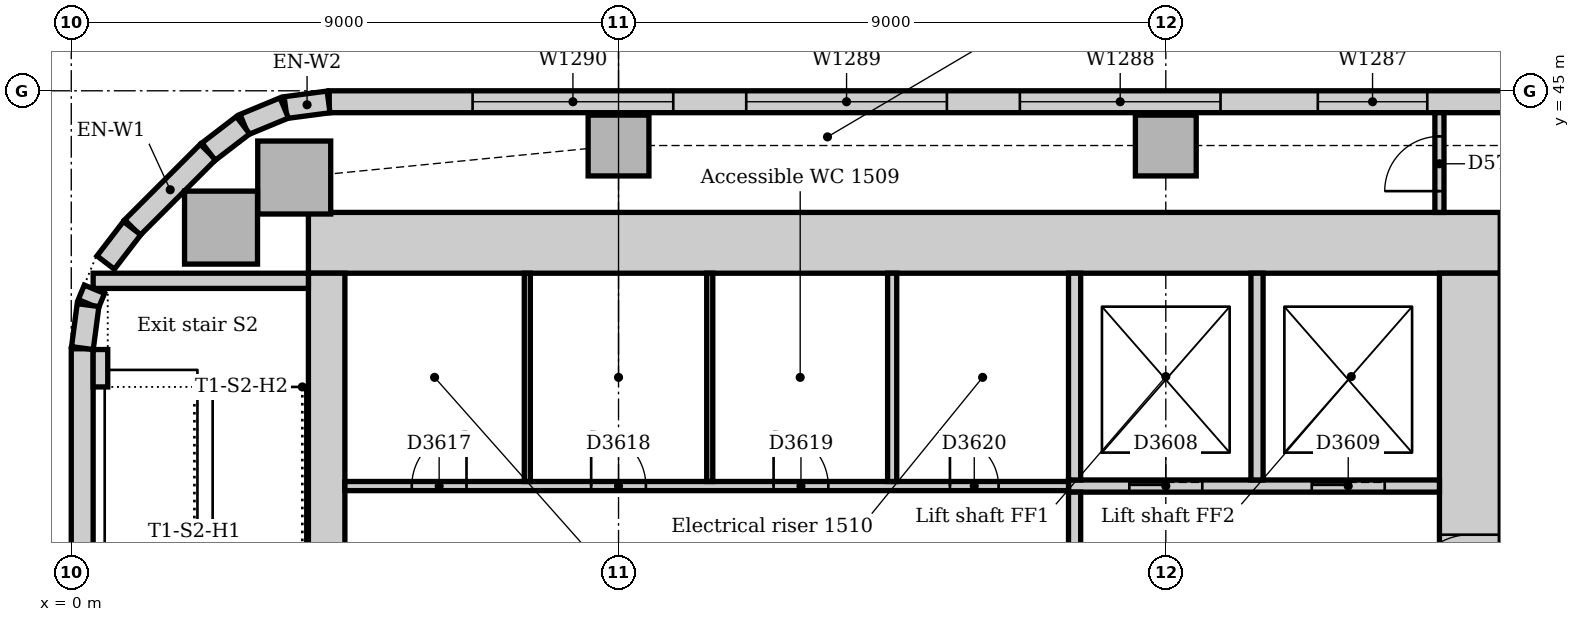
"""IFC4 building model, lengths in metres.
Left out: names, types, materials, properties, quantities, classifications, styles, units other than length and angle.
Written with IfcOpenShell. Run it as: python <this file> out.ifc"""

import sys

from ifc_helpers import new_model, si_unit, direction, frame, frame_2d, origin, origin_2d, place, context, subcontext, project, spatial, rectangle, extrude, element, fill, save


model = new_model("IFC4")
c1 = context("Model", 3, precision=1e-05, world=origin(), true_north=direction((0.0, 1.0)))
c2 = subcontext(c1, "Body", "Model", "MODEL_VIEW")
j1 = project(units=[si_unit("LENGTHUNIT", "METRE"), si_unit("PLANEANGLEUNIT", "RADIAN")], contexts=[c1])
p1 = place(None, origin())
s1 = spatial("IfcSite", under=j1, at=p1, CompositionType="ELEMENT")
p2 = place(p1, origin())
s2 = spatial("IfcBuilding", under=s1, at=p2, CompositionType="ELEMENT")
p3 = place(p2, frame((0.0, 0.0, 67.0)))
s3 = spatial("IfcBuildingStorey", under=s2, at=p3, CompositionType="ELEMENT", Elevation=67.0)
p4 = place(p3, frame((23.5, 42.5, 0.0), z_axis=(0.0, 0.0, 1.0), x_axis=(-1.0, 0.0, 0.0)))
e1 = element("IfcWall", 1, at=p4, inside=s3, PredefinedType="SOLIDWALL", context=c2, shape_type="SweptSolid", body=[
    extrude(rectangle(XDim=19.6, YDim=1.0, at=frame_2d((9.8, 0.0))), origin(), (0.0, 0.0, 1.0), 4.0),
])
p5 = place(p3, frame((23.0, 31.5, 0.0), z_axis=(0.0, 0.0, 1.0), x_axis=(0.0, 1.0, 0.0)))
e2 = element("IfcWall", 2, at=p5, inside=s3, PredefinedType="SOLIDWALL", context=c2, shape_type="SweptSolid", body=[
    extrude(rectangle(XDim=10.5, YDim=1.0, at=frame_2d((5.25, 0.0))), origin(), (0.0, 0.0, 1.0), 4.0),
])
p6 = place(p5, frame((3.15, 0.0, 0.0)))
e3 = element("IfcOpeningElement", 3, at=p6, cuts=e2, PredefinedType="OPENING", context=c2, shape_type="SweptSolid", body=[
    extrude(rectangle(XDim=1.0, YDim=2.1, at=frame_2d((0.5, 1.05))), frame((0.0, 0.51, 0.0), z_axis=(0.0, -1.0, 0.0), x_axis=(1.0, 0.0, 0.0)), (0.0, 0.0, 1.0), 1.02),
])
p7 = place(p5, frame((5.2, 0.0, 0.0)))
e4 = element("IfcOpeningElement", 4, at=p7, cuts=e2, PredefinedType="OPENING", context=c2, shape_type="SweptSolid", body=[
    extrude(rectangle(XDim=1.0, YDim=2.1, at=frame_2d((0.5, 1.05))), frame((0.0, 0.51, 0.0), z_axis=(0.0, -1.0, 0.0), x_axis=(1.0, 0.0, 0.0)), (0.0, 0.0, 1.0), 1.02),
])
p8 = place(p3, frame((4.2, 42.0, 0.0), z_axis=(0.0, 0.0, 1.0), x_axis=(0.0, -1.0, 0.0)))
e5 = element("IfcWall", 5, at=p8, inside=s3, PredefinedType="SOLIDWALL", context=c2, shape_type="SweptSolid", body=[
    extrude(rectangle(XDim=10.5, YDim=0.6, at=frame_2d((5.25, 0.0))), origin(), (0.0, 0.0, 1.0), 4.0),
])
p9 = place(p8, frame((5.3, 0.0, 0.0)))
e6 = element("IfcOpeningElement", 6, at=p9, cuts=e5, PredefinedType="OPENING", context=c2, shape_type="SweptSolid", body=[
    extrude(rectangle(XDim=1.0, YDim=2.1, at=frame_2d((0.5, 1.05))), frame((0.0, 0.31, 0.0), z_axis=(0.0, -1.0, 0.0), x_axis=(1.0, 0.0, 0.0)), (0.0, 0.0, 1.0), 0.62),
])
p10 = place(p3, frame((3.9, 41.875, 0.0), z_axis=(0.0, 0.0, 1.0), x_axis=(-1.0, 0.0, 0.0)))
e7 = element("IfcWall", 7, at=p10, inside=s3, PredefinedType="SOLIDWALL", context=c2, shape_type="SweptSolid", body=[
    extrude(rectangle(XDim=3.54, YDim=0.25, at=frame_2d((1.77, 0.0))), origin(), (0.0, 0.0, 1.0), 4.0),
])
for number, where, z_axis, x_axis in (
    (8, (3.667, 43.574, 0.0), (0.0, 0.0, 1.0), (1.0, 0.0, 0.0)),
    (9, (2.463, 42.75, 0.0), (0.0, 0.0, 1.0), (1.0, 0.0, 0.0)),
):
    element("IfcColumn", number, at=place(p3, frame(where, z_axis=z_axis, x_axis=x_axis)), inside=s3, PredefinedType="COLUMN", context=c2, shape_type="SweptSolid", body=[
        extrude(rectangle(XDim=1.2, YDim=1.2, at=origin_2d()), origin(), (0.0, 0.0, 1.0), 3.85),
    ])
for number, where, z_axis, x_axis in (
    (10, (9.0, 44.1, 0.0), (0.0, 0.0, 1.0), (1.0, 0.0, 0.0)),
    (11, (18.0, 44.1, 0.0), (0.0, 0.0, 1.0), (1.0, 0.0, 0.0)),
):
    element("IfcColumn", number, at=place(p3, frame(where, z_axis=z_axis, x_axis=x_axis)), inside=s3, PredefinedType="COLUMN", context=c2, shape_type="SweptSolid", body=[
        extrude(rectangle(XDim=1.0, YDim=1.0, at=origin_2d()), origin(), (0.0, 0.0, 1.0), 3.85),
    ])
p11 = place(p3, frame((48.257, 44.82, 0.0), z_axis=(0.0, 0.0, 1.0), x_axis=(-1.0, 0.0, 0.0)))
e12 = element("IfcWall", 12, at=p11, inside=s3, PredefinedType="STANDARD", context=c2, shape_type="SweptSolid", body=[
    extrude(rectangle(XDim=44.015, YDim=0.36, at=frame_2d((22.007, 0.0))), origin(), (0.0, 0.0, 1.0), 3.85),
])
p12 = place(p11, frame((2.057, 0.0, 0.9)))
e13 = element("IfcOpeningElement", 13, at=p12, cuts=e12, PredefinedType="OPENING", context=c2, shape_type="SweptSolid", body=[
    extrude(rectangle(XDim=3.3, YDim=1.6, at=frame_2d((1.65, 0.8))), frame((0.0, 0.19, 0.0), z_axis=(0.0, -1.0, 0.0), x_axis=(1.0, 0.0, 0.0)), (0.0, 0.0, 1.0), 0.38),
])
p13 = place(p11, frame((6.857, 0.0, 0.9)))
e14 = element("IfcOpeningElement", 14, at=p13, cuts=e12, PredefinedType="OPENING", context=c2, shape_type="SweptSolid", body=[
    extrude(rectangle(XDim=3.3, YDim=1.6, at=frame_2d((1.65, 0.8))), frame((0.0, 0.19, 0.0), z_axis=(0.0, -1.0, 0.0), x_axis=(1.0, 0.0, 0.0)), (0.0, 0.0, 1.0), 0.38),
])
p14 = place(p11, frame((11.357, 0.0, 0.9)))
e15 = element("IfcOpeningElement", 15, at=p14, cuts=e12, PredefinedType="OPENING", context=c2, shape_type="SweptSolid", body=[
    extrude(rectangle(XDim=3.3, YDim=1.6, at=frame_2d((1.65, 0.8))), frame((0.0, 0.19, 0.0), z_axis=(0.0, -1.0, 0.0), x_axis=(1.0, 0.0, 0.0)), (0.0, 0.0, 1.0), 0.38),
])
p15 = place(p11, frame((15.857, 0.0, 0.9)))
e16 = element("IfcOpeningElement", 16, at=p15, cuts=e12, PredefinedType="OPENING", context=c2, shape_type="SweptSolid", body=[
    extrude(rectangle(XDim=3.3, YDim=1.6, at=frame_2d((1.65, 0.8))), frame((0.0, 0.19, 0.0), z_axis=(0.0, -1.0, 0.0), x_axis=(1.0, 0.0, 0.0)), (0.0, 0.0, 1.0), 0.38),
])
p16 = place(p11, frame((20.357, 0.0, 0.9)))
e17 = element("IfcOpeningElement", 17, at=p16, cuts=e12, PredefinedType="OPENING", context=c2, shape_type="SweptSolid", body=[
    extrude(rectangle(XDim=3.3, YDim=1.6, at=frame_2d((1.65, 0.8))), frame((0.0, 0.19, 0.0), z_axis=(0.0, -1.0, 0.0), x_axis=(1.0, 0.0, 0.0)), (0.0, 0.0, 1.0), 0.38),
])
p17 = place(p11, frame((25.957, 0.0, 0.9)))
e18 = element("IfcOpeningElement", 18, at=p17, cuts=e12, PredefinedType="OPENING", context=c2, shape_type="SweptSolid", body=[
    extrude(rectangle(XDim=1.8, YDim=1.6, at=frame_2d((0.9, 0.8))), frame((0.0, 0.19, 0.0), z_axis=(0.0, -1.0, 0.0), x_axis=(1.0, 0.0, 0.0)), (0.0, 0.0, 1.0), 0.38),
])
p18 = place(p11, frame((29.357, 0.0, 0.9)))
e19 = element("IfcOpeningElement", 19, at=p18, cuts=e12, PredefinedType="OPENING", context=c2, shape_type="SweptSolid", body=[
    extrude(rectangle(XDim=3.3, YDim=1.6, at=frame_2d((1.65, 0.8))), frame((0.0, 0.19, 0.0), z_axis=(0.0, -1.0, 0.0), x_axis=(1.0, 0.0, 0.0)), (0.0, 0.0, 1.0), 0.38),
])
p19 = place(p11, frame((33.857, 0.0, 0.9)))
e20 = element("IfcOpeningElement", 20, at=p19, cuts=e12, PredefinedType="OPENING", context=c2, shape_type="SweptSolid", body=[
    extrude(rectangle(XDim=3.3, YDim=1.6, at=frame_2d((1.65, 0.8))), frame((0.0, 0.19, 0.0), z_axis=(0.0, -1.0, 0.0), x_axis=(1.0, 0.0, 0.0)), (0.0, 0.0, 1.0), 0.38),
])
p20 = place(p11, frame((38.357, 0.0, 0.9)))
e21 = element("IfcOpeningElement", 21, at=p20, cuts=e12, PredefinedType="OPENING", context=c2, shape_type="SweptSolid", body=[
    extrude(rectangle(XDim=3.3, YDim=1.6, at=frame_2d((1.65, 0.8))), frame((0.0, 0.19, 0.0), z_axis=(0.0, -1.0, 0.0), x_axis=(1.0, 0.0, 0.0)), (0.0, 0.0, 1.0), 0.38),
])
p21 = place(p3, frame((2.249, 43.994, 0.0), z_axis=(0.0, 0.0, 1.0), x_axis=(-0.707106781187, -0.707106781187, 0.0)))
e22 = element("IfcWall", 22, at=p21, inside=s3, PredefinedType="STANDARD", context=c2, shape_type="SweptSolid", body=[
    extrude(rectangle(XDim=1.757, YDim=0.36, at=frame_2d((0.879, 0.0))), origin(), (0.0, 0.0, 1.0), 3.85),
])
p22 = place(p3, frame((0.18, 40.757, 0.0), z_axis=(0.0, 0.0, 1.0), x_axis=(0.0, -1.0, 0.0)))
e23 = element("IfcWall", 23, at=p22, inside=s3, PredefinedType="STANDARD", context=c2, shape_type="SweptSolid", body=[
    extrude(rectangle(XDim=4.757, YDim=0.36, at=frame_2d((2.379, 0.0))), origin(), (0.0, 0.0, 1.0), 3.85),
])
for number, where, z_axis, x_axis in (
    (24, (4.231, 44.817, 0.0), (0.0, 0.0, 1.0), (-0.991, -0.131, 0.0)),
    (25, (3.503, 44.718, 0.0), (0.0, 0.0, 1.0), (-0.924, -0.383, 0.0)),
):
    element("IfcWall", number, at=place(p3, frame(where, z_axis=z_axis, x_axis=x_axis)), inside=s3, PredefinedType="STANDARD", context=c2, shape_type="SweptSolid", body=[
        extrude(rectangle(XDim=0.713, YDim=0.36, at=frame_2d((0.356, 0.0))), origin(), (0.0, 0.0, 1.0), 3.85),
    ])
for number, where, z_axis, x_axis in (
    (26, (2.825, 44.434, 0.0), (0.0, 0.0, 1.0), (-0.793, -0.609, 0.0)),
    (27, (1.0, 42.741, 0.0), (0.0, 0.0, 1.0), (-0.609, -0.793, 0.0)),
):
    element("IfcWall", number, at=place(p3, frame(where, z_axis=z_axis, x_axis=x_axis)), inside=s3, PredefinedType="STANDARD", context=c2, shape_type="SweptSolid", body=[
        extrude(rectangle(XDim=0.713, YDim=0.36, at=frame_2d((0.357, 0.0))), origin(), (0.0, 0.0, 1.0), 3.85),
    ])
p23 = place(p3, frame((0.381, 41.736, 0.0), z_axis=(0.0, 0.0, 1.0), x_axis=(-0.382773360986, -0.923842277729, 0.0)))
e28 = element("IfcWall", 28, at=p23, inside=s3, PredefinedType="STANDARD", context=c2, shape_type="SweptSolid", body=[
    extrude(rectangle(XDim=0.258, YDim=0.36, at=frame_2d((0.129, 0.0))), origin(), (0.0, 0.0, 1.0), 3.85),
])
p24 = place(p3, frame((0.276, 41.476, 0.0), z_axis=(0.0, 0.0, 1.0), x_axis=(-0.13055608231, -0.99144092581, 0.0)))
e29 = element("IfcWall", 29, at=p24, inside=s3, PredefinedType="STANDARD", context=c2, shape_type="SweptSolid", body=[
    extrude(rectangle(XDim=0.713, YDim=0.36, at=frame_2d((0.356, 0.0))), origin(), (0.0, 0.0, 1.0), 3.85),
])
p25 = place(p3, frame((0.48, 40.13, 0.0), z_axis=(0.0, 0.0, 1.0), x_axis=(0.0, 1.0, 0.0)))
e30 = element("IfcWall", 30, at=p25, inside=s3, PredefinedType="STANDARD", context=c2, shape_type="SweptSolid", body=[
    extrude(rectangle(XDim=0.615, YDim=0.24, at=frame_2d((0.307, 0.0))), origin(), (0.0, 0.0, 1.0), 4.0),
])
p26 = place(p3, frame((16.4, 38.5, 0.0), z_axis=(0.0, 0.0, 1.0), x_axis=(1.0, 0.0, 0.0)))
e31 = element("IfcWall", 31, at=p26, inside=s3, PredefinedType="PARTITIONING", context=c2, shape_type="SweptSolid", body=[
    extrude(rectangle(XDim=6.1, YDim=0.2, at=frame_2d((3.05, 0.0))), origin(), (0.0, 0.0, 1.0), 3.85),
])
p27 = place(p26, frame((1.0, 0.0, 0.0)))
e32 = element("IfcOpeningElement", 32, at=p27, cuts=e31, PredefinedType="OPENING", context=c2, shape_type="SweptSolid", body=[
    extrude(rectangle(XDim=1.2, YDim=2.1, at=frame_2d((0.6, 1.05))), frame((0.0, 0.11, 0.0), z_axis=(0.0, -1.0, 0.0), x_axis=(1.0, 0.0, 0.0)), (0.0, 0.0, 1.0), 0.22),
])
p28 = place(p26, frame((4.0, 0.0, 0.0)))
e33 = element("IfcOpeningElement", 33, at=p28, cuts=e31, PredefinedType="OPENING", context=c2, shape_type="SweptSolid", body=[
    extrude(rectangle(XDim=1.2, YDim=2.1, at=frame_2d((0.6, 1.05))), frame((0.0, 0.11, 0.0), z_axis=(0.0, -1.0, 0.0), x_axis=(1.0, 0.0, 0.0)), (0.0, 0.0, 1.0), 0.22),
])
p29 = place(p3, frame((16.5, 35.85, 0.0), z_axis=(0.0, 0.0, 1.0), x_axis=(0.0, 1.0, 0.0)))
e34 = element("IfcWall", 34, at=p29, inside=s3, PredefinedType="PARTITIONING", context=c2, shape_type="SweptSolid", body=[
    extrude(rectangle(XDim=2.55, YDim=0.2, at=frame_2d((1.275, 0.0))), origin(), (0.0, 0.0, 1.0), 3.85),
])
for number, where, z_axis, x_axis in (
    (35, (16.5, 38.6, 0.0), (0.0, 0.0, 1.0), (0.0, 1.0, 0.0)),
    (36, (19.5, 38.6, 0.0), (0.0, 0.0, 1.0), (0.0, 1.0, 0.0)),
):
    element("IfcWall", number, at=place(p3, frame(where, z_axis=z_axis, x_axis=x_axis)), inside=s3, PredefinedType="PARTITIONING", context=c2, shape_type="SweptSolid", body=[
        extrude(rectangle(XDim=3.4, YDim=0.2, at=frame_2d((1.7, 0.0))), origin(), (0.0, 0.0, 1.0), 3.85),
    ])
p30 = place(p3, frame((4.5, 38.5, 0.0), z_axis=(0.0, 0.0, 1.0), x_axis=(1.0, 0.0, 0.0)))
e37 = element("IfcWall", 37, at=p30, inside=s3, PredefinedType="PARTITIONING", context=c2, shape_type="SweptSolid", body=[
    extrude(rectangle(XDim=11.9, YDim=0.15, at=frame_2d((5.95, 0.0))), origin(), (0.0, 0.0, 1.0), 3.85),
])
p31 = place(p30, frame((1.1, 0.0, 0.0)))
e38 = element("IfcOpeningElement", 38, at=p31, cuts=e37, PredefinedType="OPENING", context=c2, shape_type="SweptSolid", body=[
    extrude(rectangle(XDim=0.9, YDim=2.1, at=frame_2d((0.45, 1.05))), frame((0.0, 0.085, 0.0), z_axis=(0.0, -1.0, 0.0), x_axis=(1.0, 0.0, 0.0)), (0.0, 0.0, 1.0), 0.17),
])
p32 = place(p30, frame((4.05, 0.0, 0.0)))
e39 = element("IfcOpeningElement", 39, at=p32, cuts=e37, PredefinedType="OPENING", context=c2, shape_type="SweptSolid", body=[
    extrude(rectangle(XDim=0.9, YDim=2.1, at=frame_2d((0.45, 1.05))), frame((0.0, 0.085, 0.0), z_axis=(0.0, -1.0, 0.0), x_axis=(1.0, 0.0, 0.0)), (0.0, 0.0, 1.0), 0.17),
])
p33 = place(p30, frame((7.05, 0.0, 0.0)))
e40 = element("IfcOpeningElement", 40, at=p33, cuts=e37, PredefinedType="OPENING", context=c2, shape_type="SweptSolid", body=[
    extrude(rectangle(XDim=0.9, YDim=2.1, at=frame_2d((0.45, 1.05))), frame((0.0, 0.085, 0.0), z_axis=(0.0, -1.0, 0.0), x_axis=(1.0, 0.0, 0.0)), (0.0, 0.0, 1.0), 0.17),
])
p34 = place(p30, frame((9.95, 0.0, 0.0)))
e41 = element("IfcOpeningElement", 41, at=p34, cuts=e37, PredefinedType="OPENING", context=c2, shape_type="SweptSolid", body=[
    extrude(rectangle(XDim=0.8, YDim=2.1, at=frame_2d((0.4, 1.05))), frame((0.0, 0.085, 0.0), z_axis=(0.0, -1.0, 0.0), x_axis=(1.0, 0.0, 0.0)), (0.0, 0.0, 1.0), 0.17),
])
p35 = place(p3, frame((22.5, 43.0, 0.0), z_axis=(0.0, 0.0, 1.0), x_axis=(0.0, 1.0, 0.0)))
e42 = element("IfcWall", 42, at=p35, inside=s3, PredefinedType="PARTITIONING", context=c2, shape_type="SweptSolid", body=[
    extrude(rectangle(XDim=1.64, YDim=0.15, at=frame_2d((0.82, 0.0))), origin(), (0.0, 0.0, 1.0), 3.85),
])
p36 = place(p35, frame((0.35, 0.0, 0.0)))
e43 = element("IfcOpeningElement", 43, at=p36, cuts=e42, PredefinedType="OPENING", context=c2, shape_type="SweptSolid", body=[
    extrude(rectangle(XDim=0.9, YDim=2.1, at=frame_2d((0.45, 1.05))), frame((0.0, 0.085, 0.0), z_axis=(0.0, -1.0, 0.0), x_axis=(1.0, 0.0, 0.0)), (0.0, 0.0, 1.0), 0.17),
])
p37 = place(p3, frame((13.5, 38.575, 0.0), z_axis=(0.0, 0.0, 1.0), x_axis=(0.0, 1.0, 0.0)))
e44 = element("IfcWall", 44, at=p37, inside=s3, PredefinedType="PARTITIONING", context=c2, shape_type="SweptSolid", body=[
    extrude(rectangle(XDim=3.425, YDim=0.15, at=frame_2d((1.712, 0.0))), origin(), (0.0, 0.0, 1.0), 3.85),
])
for number, where, z_axis, x_axis in (
    (45, (7.5, 38.575, 0.0), (0.0, 0.0, 1.0), (0.0, 1.0, 0.0)),
    (46, (10.5, 38.575, 0.0), (0.0, 0.0, 1.0), (0.0, 1.0, 0.0)),
):
    element("IfcWall", number, at=place(p3, frame(where, z_axis=z_axis, x_axis=x_axis)), inside=s3, PredefinedType="PARTITIONING", context=c2, shape_type="SweptSolid", body=[
        extrude(rectangle(XDim=3.425, YDim=0.1, at=frame_2d((1.712, 0.0))), origin(), (0.0, 0.0, 1.0), 3.85),
    ])
p38 = place(p17, origin())
e47 = element("IfcWindow", 47, at=p38, inside=s3, PartitioningType="SINGLE_PANEL", PredefinedType="WINDOW", context=c2, shape_type="SweptSolid", body=[
    extrude(rectangle(XDim=1.8, YDim=1.6, at=frame_2d((0.9, 0.8))), frame((0.0, 0.13, 0.0), z_axis=(0.0, -1.0, 0.0), x_axis=(1.0, 0.0, 0.0)), (0.0, 0.0, 1.0), 0.06),
])
fill(e18, e47)
p39 = place(p18, origin())
e48 = element("IfcWindow", 48, at=p39, inside=s3, PartitioningType="SINGLE_PANEL", PredefinedType="WINDOW", context=c2, shape_type="SweptSolid", body=[
    extrude(rectangle(XDim=3.3, YDim=1.6, at=frame_2d((1.65, 0.8))), frame((0.0, 0.13, 0.0), z_axis=(0.0, -1.0, 0.0), x_axis=(1.0, 0.0, 0.0)), (0.0, 0.0, 1.0), 0.06),
])
fill(e19, e48)
p40 = place(p19, origin())
e49 = element("IfcWindow", 49, at=p40, inside=s3, PartitioningType="SINGLE_PANEL", PredefinedType="WINDOW", context=c2, shape_type="SweptSolid", body=[
    extrude(rectangle(XDim=3.3, YDim=1.6, at=frame_2d((1.65, 0.8))), frame((0.0, 0.13, 0.0), z_axis=(0.0, -1.0, 0.0), x_axis=(1.0, 0.0, 0.0)), (0.0, 0.0, 1.0), 0.06),
])
fill(e20, e49)
p41 = place(p20, origin())
e50 = element("IfcWindow", 50, at=p41, inside=s3, PartitioningType="SINGLE_PANEL", PredefinedType="WINDOW", context=c2, shape_type="SweptSolid", body=[
    extrude(rectangle(XDim=3.3, YDim=1.6, at=frame_2d((1.65, 0.8))), frame((0.0, 0.13, 0.0), z_axis=(0.0, -1.0, 0.0), x_axis=(1.0, 0.0, 0.0)), (0.0, 0.0, 1.0), 0.06),
])
fill(e21, e50)
p42 = place(p27, origin())
e51 = element("IfcDoor", 51, at=p42, inside=s3, OperationType="SLIDING_TO_LEFT", PredefinedType="DOOR", context=c2, shape_type="SweptSolid", body=[
    extrude(rectangle(XDim=1.2, YDim=2.1, at=frame_2d((0.6, 1.05))), frame((0.0, 0.025, 0.0), z_axis=(0.0, -1.0, 0.0), x_axis=(1.0, 0.0, 0.0)), (0.0, 0.0, 1.0), 0.05),
])
fill(e32, e51)
p43 = place(p28, origin())
e52 = element("IfcDoor", 52, at=p43, inside=s3, OperationType="SLIDING_TO_LEFT", PredefinedType="DOOR", context=c2, shape_type="SweptSolid", body=[
    extrude(rectangle(XDim=1.2, YDim=2.1, at=frame_2d((0.6, 1.05))), frame((0.0, 0.025, 0.0), z_axis=(0.0, -1.0, 0.0), x_axis=(1.0, 0.0, 0.0)), (0.0, 0.0, 1.0), 0.05),
])
fill(e33, e52)
p44 = place(p7, origin())
e53 = element("IfcDoor", 53, at=p44, inside=s3, OperationType="SINGLE_SWING_LEFT", PredefinedType="DOOR", context=c2, shape_type="SweptSolid", body=[
    extrude(rectangle(XDim=1.0, YDim=2.1, at=frame_2d((0.5, 1.05))), frame((0.0, 0.025, 0.0), z_axis=(0.0, -1.0, 0.0), x_axis=(1.0, 0.0, 0.0)), (0.0, 0.0, 1.0), 0.05),
])
fill(e4, e53)
p45 = place(p31, origin())
e54 = element("IfcDoor", 54, at=p45, inside=s3, OperationType="SINGLE_SWING_RIGHT", PredefinedType="DOOR", context=c2, shape_type="SweptSolid", body=[
    extrude(rectangle(XDim=0.9, YDim=2.1, at=frame_2d((0.45, 1.05))), frame((0.0, 0.025, 0.0), z_axis=(0.0, -1.0, 0.0), x_axis=(1.0, 0.0, 0.0)), (0.0, 0.0, 1.0), 0.05),
])
fill(e38, e54)
p46 = place(p32, origin())
e55 = element("IfcDoor", 55, at=p46, inside=s3, OperationType="SINGLE_SWING_LEFT", PredefinedType="DOOR", context=c2, shape_type="SweptSolid", body=[
    extrude(rectangle(XDim=0.9, YDim=2.1, at=frame_2d((0.45, 1.05))), frame((0.0, 0.025, 0.0), z_axis=(0.0, -1.0, 0.0), x_axis=(1.0, 0.0, 0.0)), (0.0, 0.0, 1.0), 0.05),
])
fill(e39, e55)
p47 = place(p33, origin())
e56 = element("IfcDoor", 56, at=p47, inside=s3, OperationType="SINGLE_SWING_LEFT", PredefinedType="DOOR", context=c2, shape_type="SweptSolid", body=[
    extrude(rectangle(XDim=0.9, YDim=2.1, at=frame_2d((0.45, 1.05))), frame((0.0, 0.025, 0.0), z_axis=(0.0, -1.0, 0.0), x_axis=(1.0, 0.0, 0.0)), (0.0, 0.0, 1.0), 0.05),
])
fill(e40, e56)
p48 = place(p34, origin())
e57 = element("IfcDoor", 57, at=p48, inside=s3, OperationType="SINGLE_SWING_LEFT", PredefinedType="DOOR", context=c2, shape_type="SweptSolid", body=[
    extrude(rectangle(XDim=0.8, YDim=2.1, at=frame_2d((0.4, 1.05))), frame((0.0, 0.025, 0.0), z_axis=(0.0, -1.0, 0.0), x_axis=(1.0, 0.0, 0.0)), (0.0, 0.0, 1.0), 0.05),
])
fill(e41, e57)
p49 = place(p36, origin())
e58 = element("IfcDoor", 58, at=p49, inside=s3, OperationType="SINGLE_SWING_LEFT", PredefinedType="DOOR", context=c2, shape_type="SweptSolid", body=[
    extrude(rectangle(XDim=0.9, YDim=2.1, at=frame_2d((0.45, 1.05))), frame((0.0, 0.025, 0.0), z_axis=(0.0, -1.0, 0.0), x_axis=(1.0, 0.0, 0.0)), (0.0, 0.0, 1.0), 0.05),
])
fill(e43, e58)
save(model, sys.argv[1])
